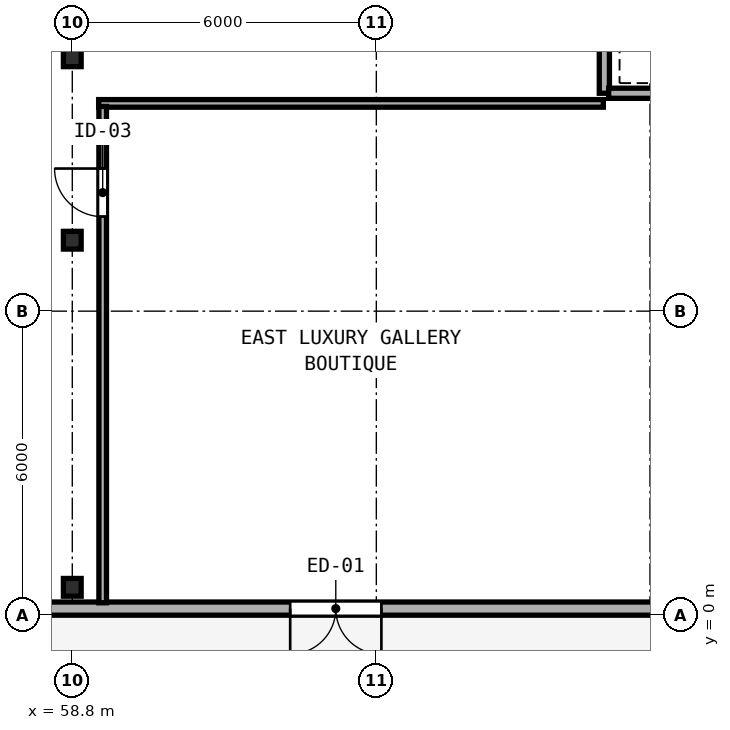
"""IFC4 building model, lengths in metres.
Left out: names, types, materials, properties, quantities, classifications, styles, units other than length and angle.
Written with IfcOpenShell. Run it as: python <this file> out.ifc"""

import sys

from ifc_helpers import new_model, si_unit, direction, frame, frame_2d, origin, origin_2d, place, context, subcontext, project, spatial, rectangle, i_section, extrude, element, fill, save


model = new_model("IFC4")
c1 = context("Model", 3, precision=1e-05, world=origin(), true_north=direction((0.0, 1.0)))
c2 = subcontext(c1, "Body", "Model", "MODEL_VIEW")
j1 = project(units=[si_unit("LENGTHUNIT", "METRE"), si_unit("PLANEANGLEUNIT", "RADIAN")], contexts=[c1])
p1 = place(None, origin())
s1 = spatial("IfcSite", under=j1, at=p1, CompositionType="ELEMENT")
p2 = place(p1, origin())
s2 = spatial("IfcBuilding", under=s1, at=p2, CompositionType="ELEMENT")
p3 = place(p2, origin())
s3 = spatial("IfcBuildingStorey", under=s2, at=p3, CompositionType="ELEMENT", Elevation=0.0)
for number, where, z_axis, x_axis in (
    (1, (58.8, 0.55, 0.0), (0.0, 0.0, 1.0), (1.0, 0.0, 0.0)),
    (2, (58.8, 7.4, 0.0), (0.0, 0.0, 1.0), (1.0, 0.0, 0.0)),
    (3, (58.8, 11.0, 0.0), (0.0, 0.0, 1.0), (1.0, 0.0, 0.0)),
):
    element("IfcColumn", number, at=place(p3, frame(where, z_axis=z_axis, x_axis=x_axis)), inside=s3, PredefinedType="COLUMN", context=c2, shape_type="SweptSolid", body=[
        extrude(i_section(OverallWidth=0.35, OverallDepth=0.35, WebThickness=0.012, FlangeThickness=0.019, FilletRadius=0.02, at=origin_2d()), origin(), (0.0, 0.0, 1.0), 5.4),
    ])
p4 = place(p3, frame((2.399, 0.13, 0.0), z_axis=(0.0, 0.0, 1.0), x_axis=(1.0, 0.0, 0.0)))
e4 = element("IfcWall", 4, at=p4, inside=s3, PredefinedType="SOLIDWALL", context=c2, shape_type="SweptSolid", body=[
    extrude(rectangle(XDim=72.002, YDim=0.26, at=frame_2d((36.001, 0.0))), origin(), (0.0, 0.0, 1.0), 5.16),
])
p5 = place(p4, frame((26.001, 0.0, 0.0), z_axis=(0.0, 0.0, 1.0), x_axis=(-1.0, 0.0, 0.0)))
e5 = element("IfcOpeningElement", 5, at=p5, cuts=e4, PredefinedType="OPENING", context=c2, shape_type="SweptSolid", body=[
    extrude(rectangle(XDim=1.8, YDim=2.35, at=frame_2d((0.9, 1.175))), frame((0.0, 0.14, 0.0), z_axis=(0.0, -1.0, 0.0), x_axis=(1.0, 0.0, 0.0)), (0.0, 0.0, 1.0), 0.28),
])
p6 = place(p4, frame((36.901, 0.0, 0.0), z_axis=(0.0, 0.0, 1.0), x_axis=(-1.0, 0.0, 0.0)))
e6 = element("IfcOpeningElement", 6, at=p6, cuts=e4, PredefinedType="OPENING", context=c2, shape_type="SweptSolid", body=[
    extrude(rectangle(XDim=1.8, YDim=2.35, at=frame_2d((0.9, 1.175))), frame((0.0, 0.14, 0.0), z_axis=(0.0, -1.0, 0.0), x_axis=(1.0, 0.0, 0.0)), (0.0, 0.0, 1.0), 0.28),
])
p7 = place(p4, frame((47.801, 0.0, 0.0), z_axis=(0.0, 0.0, 1.0), x_axis=(-1.0, 0.0, 0.0)))
e7 = element("IfcOpeningElement", 7, at=p7, cuts=e4, PredefinedType="OPENING", context=c2, shape_type="SweptSolid", body=[
    extrude(rectangle(XDim=1.8, YDim=2.35, at=frame_2d((0.9, 1.175))), frame((0.0, 0.14, 0.0), z_axis=(0.0, -1.0, 0.0), x_axis=(1.0, 0.0, 0.0)), (0.0, 0.0, 1.0), 0.28),
])
p8 = place(p4, frame((8.001, 0.0, 0.0), z_axis=(0.0, 0.0, 1.0), x_axis=(-1.0, 0.0, 0.0)))
e8 = element("IfcOpeningElement", 8, at=p8, cuts=e4, PredefinedType="OPENING", context=c2, shape_type="SweptSolid", body=[
    extrude(rectangle(XDim=1.8, YDim=2.35, at=frame_2d((0.9, 1.175))), frame((0.0, 0.14, 0.0), z_axis=(0.0, -1.0, 0.0), x_axis=(1.0, 0.0, 0.0)), (0.0, 0.0, 1.0), 0.28),
])
p9 = place(p4, frame((62.501, 0.0, 0.0), z_axis=(0.0, 0.0, 1.0), x_axis=(-1.0, 0.0, 0.0)))
e9 = element("IfcOpeningElement", 9, at=p9, cuts=e4, PredefinedType="OPENING", context=c2, shape_type="SweptSolid", body=[
    extrude(rectangle(XDim=1.8, YDim=2.35, at=frame_2d((0.9, 1.175))), frame((0.0, 0.14, 0.0), z_axis=(0.0, -1.0, 0.0), x_axis=(1.0, 0.0, 0.0)), (0.0, 0.0, 1.0), 0.28),
])
p10 = place(p3, frame((69.3, 10.3, 0.0), z_axis=(0.0, 0.0, 1.0), x_axis=(0.0, 1.0, 0.0)))
e10 = element("IfcWall", 10, at=p10, inside=s3, PredefinedType="SOLIDWALL", context=c2, shape_type="SweptSolid", body=[
    extrude(rectangle(XDim=43.45, YDim=0.2, at=frame_2d((21.725, 0.0))), origin(), (0.0, 0.0, 1.0), 5.16),
])
p11 = place(p3, frame((69.385, 10.3, 0.0), z_axis=(0.0, 0.0, 1.0), x_axis=(1.0, 0.0, 0.0)))
e11 = element("IfcWall", 11, at=p11, inside=s3, PredefinedType="SOLIDWALL", context=c2, shape_type="SweptSolid", body=[
    extrude(rectangle(XDim=7.165, YDim=0.2, at=frame_2d((3.583, 0.0))), origin(), (0.0, 0.0, 1.0), 5.16),
])
p12 = place(p3, frame((59.32, 10.1, 0.0), z_axis=(0.0, 0.0, 1.0), x_axis=(1.0, 0.0, 0.0)))
e12 = element("IfcWall", 12, at=p12, inside=s3, PredefinedType="PARTITIONING", context=c2, shape_type="SweptSolid", body=[
    extrude(rectangle(XDim=9.96, YDim=0.15, at=frame_2d((4.98, 0.0))), origin(), (0.0, 0.0, 1.0), 5.16),
])
p13 = place(p3, frame((59.4, 0.245, 0.0), z_axis=(0.0, 0.0, 1.0), x_axis=(0.0, 1.0, 0.0)))
e13 = element("IfcWall", 13, at=p13, inside=s3, PredefinedType="PARTITIONING", context=c2, shape_type="SweptSolid", body=[
    extrude(rectangle(XDim=9.795, YDim=0.15, at=frame_2d((4.897, 0.0))), origin(), (0.0, 0.0, 1.0), 5.16),
])
p14 = place(p13, frame((7.619, 0.0, 0.0)))
e14 = element("IfcOpeningElement", 14, at=p14, cuts=e13, PredefinedType="OPENING", context=c2, shape_type="SweptSolid", body=[
    extrude(rectangle(XDim=0.95, YDim=2.12, at=frame_2d((0.475, 1.06))), frame((0.0, 0.085, 0.0), z_axis=(0.0, -1.0, 0.0), x_axis=(1.0, 0.0, 0.0)), (0.0, 0.0, 1.0), 0.17),
])
p15 = place(p9, origin())
e15 = element("IfcDoor", 15, at=p15, inside=s3, OperationType="DOUBLE_DOOR_SINGLE_SWING", PredefinedType="DOOR", context=c2, shape_type="SweptSolid", body=[
    extrude(rectangle(XDim=1.8, YDim=2.35, at=frame_2d((0.9, 1.175))), frame((0.0, 0.025, 0.0), z_axis=(0.0, -1.0, 0.0), x_axis=(1.0, 0.0, 0.0)), (0.0, 0.0, 1.0), 0.05),
])
fill(e9, e15)
p16 = place(p14, origin())
e16 = element("IfcDoor", 16, at=p16, inside=s3, OperationType="SINGLE_SWING_RIGHT", PredefinedType="DOOR", context=c2, shape_type="SweptSolid", body=[
    extrude(rectangle(XDim=0.95, YDim=2.12, at=frame_2d((0.475, 1.06))), frame((0.0, 0.025, 0.0), z_axis=(0.0, -1.0, 0.0), x_axis=(1.0, 0.0, 0.0)), (0.0, 0.0, 1.0), 0.05),
])
fill(e14, e16)
save(model, sys.argv[1])
